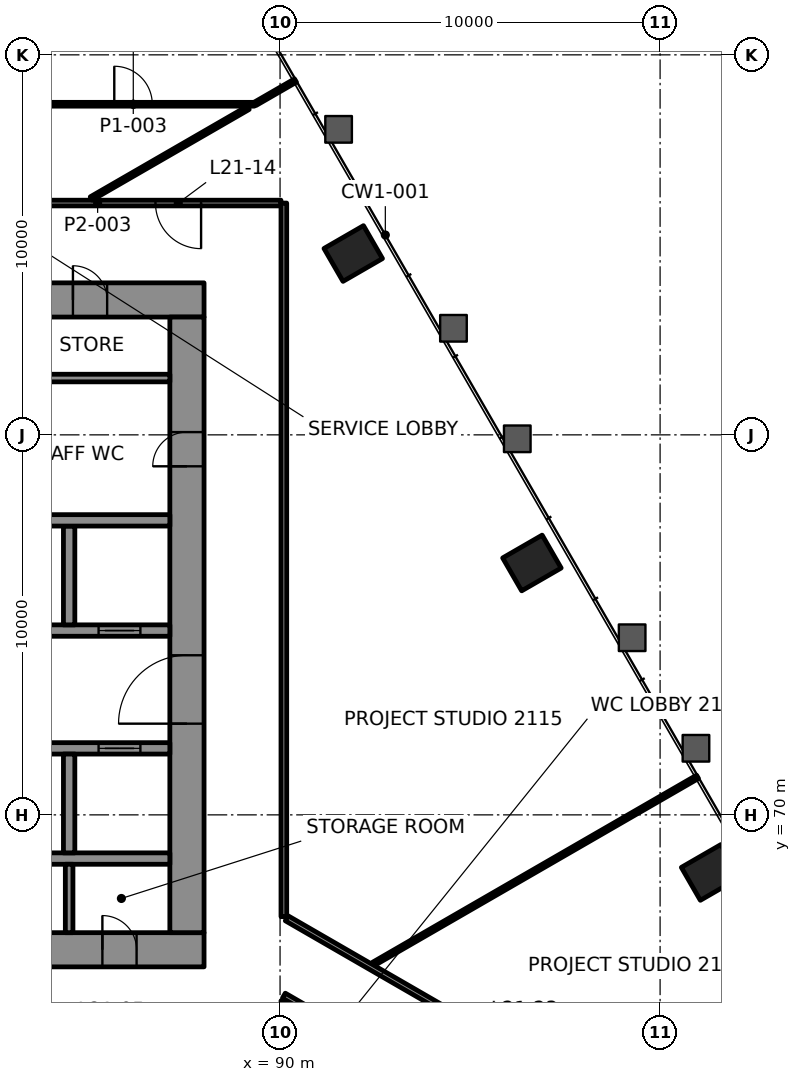
"""IFC4 building model, lengths in metres.
Left out: names, types, materials, properties, quantities, classifications, styles, units other than length and angle.
Written with IfcOpenShell. Run it as: python <this file> out.ifc"""

import sys

from ifc_helpers import new_model, si_unit, direction, frame, frame_2d, origin, origin_2d, place, context, subcontext, project, spatial, rectangle, extrude, element, fill, save


model = new_model("IFC4")
c1 = context("Model", 3, precision=1e-05, world=origin(), true_north=direction((0.0, 1.0)))
c2 = subcontext(c1, "Body", "Model", "MODEL_VIEW")
j1 = project(units=[si_unit("LENGTHUNIT", "METRE"), si_unit("PLANEANGLEUNIT", "RADIAN")], contexts=[c1])
p1 = place(None, origin())
s1 = spatial("IfcSite", under=j1, at=p1, CompositionType="ELEMENT")
p2 = place(p1, origin())
s2 = spatial("IfcBuilding", under=s1, at=p2, CompositionType="ELEMENT")
p3 = place(p2, frame((0.0, 0.0, 94.6)))
s3 = spatial("IfcBuildingStorey", under=s2, at=p3, CompositionType="ELEMENT", Elevation=94.6)
for number, where, z_axis, x_axis in (
    (1, (101.329, 68.485, -0.0), (0.0, 0.0, 1.0), (-0.5, 0.866, 0.0)),
    (2, (96.627, 76.628, -0.0), (0.0, 0.0, 1.0), (-0.5, 0.866, 0.0)),
    (3, (91.926, 84.772, -0.0), (0.0, 0.0, 1.0), (-0.5, 0.866, 0.0)),
):
    element("IfcColumn", number, at=place(p3, frame(where, z_axis=z_axis, x_axis=x_axis)), inside=s3, PredefinedType="COLUMN", context=c2, shape_type="SweptSolid", body=[
        extrude(rectangle(XDim=1.0, YDim=1.2, at=origin_2d()), origin(), (0.0, 0.0, 1.0), 4.2),
    ])
p4 = place(p3, frame((62.0, 66.45, 0.0), z_axis=(0.0, 0.0, 1.0), x_axis=(1.0, 0.0, 0.0)))
e4 = element("IfcWall", 4, at=p4, inside=s3, PredefinedType="SHEAR", context=c2, shape_type="SweptSolid", body=[
    extrude(rectangle(XDim=26.0, YDim=0.9, at=frame_2d((13.0, 0.0))), origin(), (0.0, 0.0, 1.0), 4.0),
])
p5 = place(p4, frame((3.45, 0.0, 0.0)))
e5 = element("IfcOpeningElement", 5, at=p5, cuts=e4, PredefinedType="OPENING", context=c2, shape_type="SweptSolid", body=[
    extrude(rectangle(XDim=0.9, YDim=2.1, at=frame_2d((0.45, 1.05))), frame((0.0, 0.46, 0.0), z_axis=(0.0, -1.0, 0.0), x_axis=(1.0, 0.0, 0.0)), (0.0, 0.0, 1.0), 0.92),
])
p6 = place(p4, frame((6.425, 0.0, 0.0)))
e6 = element("IfcOpeningElement", 6, at=p6, cuts=e4, PredefinedType="OPENING", context=c2, shape_type="SweptSolid", body=[
    extrude(rectangle(XDim=0.9, YDim=2.1, at=frame_2d((0.45, 1.05))), frame((0.0, 0.46, 0.0), z_axis=(0.0, -1.0, 0.0), x_axis=(1.0, 0.0, 0.0)), (0.0, 0.0, 1.0), 0.92),
])
p7 = place(p4, frame((11.5, 0.0, 0.0)))
e7 = element("IfcOpeningElement", 7, at=p7, cuts=e4, PredefinedType="OPENING", context=c2, shape_type="SweptSolid", body=[
    extrude(rectangle(XDim=0.9, YDim=2.1, at=frame_2d((0.45, 1.05))), frame((0.0, 0.46, 0.0), z_axis=(0.0, -1.0, 0.0), x_axis=(1.0, 0.0, 0.0)), (0.0, 0.0, 1.0), 0.92),
])
p8 = place(p4, frame((18.5, 0.0, 0.0)))
e8 = element("IfcOpeningElement", 8, at=p8, cuts=e4, PredefinedType="OPENING", context=c2, shape_type="SweptSolid", body=[
    extrude(rectangle(XDim=0.9, YDim=2.1, at=frame_2d((0.45, 1.05))), frame((0.0, 0.46, 0.0), z_axis=(0.0, -1.0, 0.0), x_axis=(1.0, 0.0, 0.0)), (0.0, 0.0, 1.0), 0.92),
])
p9 = place(p4, frame((23.325, 0.0, 0.0)))
e9 = element("IfcOpeningElement", 9, at=p9, cuts=e4, PredefinedType="OPENING", context=c2, shape_type="SweptSolid", body=[
    extrude(rectangle(XDim=0.9, YDim=2.1, at=frame_2d((0.45, 1.05))), frame((0.0, 0.46, 0.0), z_axis=(0.0, -1.0, 0.0), x_axis=(1.0, 0.0, 0.0)), (0.0, 0.0, 1.0), 0.92),
])
p10 = place(p3, frame((62.0, 83.55, 0.0), z_axis=(0.0, 0.0, 1.0), x_axis=(1.0, 0.0, 0.0)))
e10 = element("IfcWall", 10, at=p10, inside=s3, PredefinedType="SHEAR", context=c2, shape_type="SweptSolid", body=[
    extrude(rectangle(XDim=26.0, YDim=0.9, at=frame_2d((13.0, 0.0))), origin(), (0.0, 0.0, 1.0), 4.0),
])
p11 = place(p10, frame((5.695, 0.0, 0.0)))
e11 = element("IfcOpeningElement", 11, at=p11, cuts=e10, PredefinedType="OPENING", context=c2, shape_type="SweptSolid", body=[
    extrude(rectangle(XDim=1.0, YDim=2.1, at=frame_2d((0.5, 1.05))), frame((0.0, 0.46, 0.0), z_axis=(0.0, -1.0, 0.0), x_axis=(1.0, 0.0, 0.0)), (0.0, 0.0, 1.0), 0.92),
])
p12 = place(p10, frame((19.505, 0.0, 0.0)))
e12 = element("IfcOpeningElement", 12, at=p12, cuts=e10, PredefinedType="OPENING", context=c2, shape_type="SweptSolid", body=[
    extrude(rectangle(XDim=1.0, YDim=2.1, at=frame_2d((0.5, 1.05))), frame((0.0, 0.46, 0.0), z_axis=(0.0, -1.0, 0.0), x_axis=(1.0, 0.0, 0.0)), (0.0, 0.0, 1.0), 0.92),
])
p13 = place(p10, frame((3.45, 0.0, 0.0)))
e13 = element("IfcOpeningElement", 13, at=p13, cuts=e10, PredefinedType="OPENING", context=c2, shape_type="SweptSolid", body=[
    extrude(rectangle(XDim=0.9, YDim=2.1, at=frame_2d((0.45, 1.05))), frame((0.0, 0.46, 0.0), z_axis=(0.0, -1.0, 0.0), x_axis=(1.0, 0.0, 0.0)), (0.0, 0.0, 1.0), 0.92),
])
p14 = place(p10, frame((12.65, 0.0, 0.0)))
e14 = element("IfcOpeningElement", 14, at=p14, cuts=e10, PredefinedType="OPENING", context=c2, shape_type="SweptSolid", body=[
    extrude(rectangle(XDim=0.9, YDim=2.1, at=frame_2d((0.45, 1.05))), frame((0.0, 0.46, 0.0), z_axis=(0.0, -1.0, 0.0), x_axis=(1.0, 0.0, 0.0)), (0.0, 0.0, 1.0), 0.92),
])
p15 = place(p10, frame((22.55, 0.0, 0.0)))
e15 = element("IfcOpeningElement", 15, at=p15, cuts=e10, PredefinedType="OPENING", context=c2, shape_type="SweptSolid", body=[
    extrude(rectangle(XDim=0.9, YDim=2.1, at=frame_2d((0.45, 1.05))), frame((0.0, 0.46, 0.0), z_axis=(0.0, -1.0, 0.0), x_axis=(1.0, 0.0, 0.0)), (0.0, 0.0, 1.0), 0.92),
])
p16 = place(p3, frame((87.55, 66.9, 0.0), z_axis=(0.0, 0.0, 1.0), x_axis=(0.0, 1.0, 0.0)))
e16 = element("IfcWall", 16, at=p16, inside=s3, PredefinedType="SHEAR", context=c2, shape_type="SweptSolid", body=[
    extrude(rectangle(XDim=16.2, YDim=0.9, at=frame_2d((8.1, 0.0))), origin(), (0.0, 0.0, 1.0), 4.0),
])
p17 = place(p16, frame((5.5, 0.0, 0.0)))
e17 = element("IfcOpeningElement", 17, at=p17, cuts=e16, PredefinedType="OPENING", context=c2, shape_type="SweptSolid", body=[
    extrude(rectangle(XDim=1.8, YDim=2.1, at=frame_2d((0.9, 1.05))), frame((0.0, 0.46, 0.0), z_axis=(0.0, -1.0, 0.0), x_axis=(1.0, 0.0, 0.0)), (0.0, 0.0, 1.0), 0.92),
])
p18 = place(p16, frame((12.272, 0.0, 0.0)))
e18 = element("IfcOpeningElement", 18, at=p18, cuts=e16, PredefinedType="OPENING", context=c2, shape_type="SweptSolid", body=[
    extrude(rectangle(XDim=0.9, YDim=2.1, at=frame_2d((0.45, 1.05))), frame((0.0, 0.46, 0.0), z_axis=(0.0, -1.0, 0.0), x_axis=(1.0, 0.0, 0.0)), (0.0, 0.0, 1.0), 0.92),
])
p19 = place(p3, frame((70.35, 68.85, 0.0), z_axis=(0.0, 0.0, 1.0), x_axis=(1.0, 0.0, 0.0)))
e19 = element("IfcWall", 19, at=p19, inside=s3, PredefinedType="SHEAR", context=c2, shape_type="SweptSolid", body=[
    extrude(rectangle(XDim=16.75, YDim=0.3, at=frame_2d((8.375, 0.0))), origin(), (0.0, 0.0, 1.0), 4.0),
])
p20 = place(p3, frame((70.3, 71.75, 0.0), z_axis=(0.0, 0.0, 1.0), x_axis=(1.0, 0.0, 0.0)))
e20 = element("IfcWall", 20, at=p20, inside=s3, PredefinedType="SHEAR", context=c2, shape_type="SweptSolid", body=[
    extrude(rectangle(XDim=16.8, YDim=0.3, at=frame_2d((8.4, 0.0))), origin(), (0.0, 0.0, 1.0), 4.0),
])
p21 = place(p20, frame((1.0, 0.0, 0.0)))
e21 = element("IfcOpeningElement", 21, at=p21, cuts=e20, PredefinedType="OPENING", context=c2, shape_type="SweptSolid", body=[
    extrude(rectangle(XDim=1.1, YDim=2.1, at=frame_2d((0.55, 1.05))), frame((0.0, 0.16, 0.0), z_axis=(0.0, -1.0, 0.0), x_axis=(1.0, 0.0, 0.0)), (0.0, 0.0, 1.0), 0.32),
])
p22 = place(p20, frame((3.8, 0.0, 0.0)))
e22 = element("IfcOpeningElement", 22, at=p22, cuts=e20, PredefinedType="OPENING", context=c2, shape_type="SweptSolid", body=[
    extrude(rectangle(XDim=1.1, YDim=2.1, at=frame_2d((0.55, 1.05))), frame((0.0, 0.16, 0.0), z_axis=(0.0, -1.0, 0.0), x_axis=(1.0, 0.0, 0.0)), (0.0, 0.0, 1.0), 0.32),
])
p23 = place(p20, frame((6.6, 0.0, 0.0)))
e23 = element("IfcOpeningElement", 23, at=p23, cuts=e20, PredefinedType="OPENING", context=c2, shape_type="SweptSolid", body=[
    extrude(rectangle(XDim=1.1, YDim=2.1, at=frame_2d((0.55, 1.05))), frame((0.0, 0.16, 0.0), z_axis=(0.0, -1.0, 0.0), x_axis=(1.0, 0.0, 0.0)), (0.0, 0.0, 1.0), 0.32),
])
p24 = place(p20, frame((9.4, 0.0, 0.0)))
e24 = element("IfcOpeningElement", 24, at=p24, cuts=e20, PredefinedType="OPENING", context=c2, shape_type="SweptSolid", body=[
    extrude(rectangle(XDim=1.1, YDim=2.1, at=frame_2d((0.55, 1.05))), frame((0.0, 0.16, 0.0), z_axis=(0.0, -1.0, 0.0), x_axis=(1.0, 0.0, 0.0)), (0.0, 0.0, 1.0), 0.32),
])
p25 = place(p20, frame((12.2, 0.0, 0.0)))
e25 = element("IfcOpeningElement", 25, at=p25, cuts=e20, PredefinedType="OPENING", context=c2, shape_type="SweptSolid", body=[
    extrude(rectangle(XDim=1.1, YDim=2.1, at=frame_2d((0.55, 1.05))), frame((0.0, 0.16, 0.0), z_axis=(0.0, -1.0, 0.0), x_axis=(1.0, 0.0, 0.0)), (0.0, 0.0, 1.0), 0.32),
])
p26 = place(p20, frame((14.925, 0.0, 0.0)))
e26 = element("IfcOpeningElement", 26, at=p26, cuts=e20, PredefinedType="OPENING", context=c2, shape_type="SweptSolid", body=[
    extrude(rectangle(XDim=1.1, YDim=2.1, at=frame_2d((0.55, 1.05))), frame((0.0, 0.16, 0.0), z_axis=(0.0, -1.0, 0.0), x_axis=(1.0, 0.0, 0.0)), (0.0, 0.0, 1.0), 0.32),
])
p27 = place(p3, frame((70.3, 74.85, 0.0), z_axis=(0.0, 0.0, 1.0), x_axis=(1.0, 0.0, 0.0)))
e27 = element("IfcWall", 27, at=p27, inside=s3, PredefinedType="SHEAR", context=c2, shape_type="SweptSolid", body=[
    extrude(rectangle(XDim=16.8, YDim=0.3, at=frame_2d((8.4, 0.0))), origin(), (0.0, 0.0, 1.0), 4.0),
])
p28 = place(p27, frame((3.8, 0.0, 0.0)))
e28 = element("IfcOpeningElement", 28, at=p28, cuts=e27, PredefinedType="OPENING", context=c2, shape_type="SweptSolid", body=[
    extrude(rectangle(XDim=1.1, YDim=2.1, at=frame_2d((0.55, 1.05))), frame((0.0, 0.16, 0.0), z_axis=(0.0, -1.0, 0.0), x_axis=(1.0, 0.0, 0.0)), (0.0, 0.0, 1.0), 0.32),
])
p29 = place(p27, frame((12.2, 0.0, 0.0)))
e29 = element("IfcOpeningElement", 29, at=p29, cuts=e27, PredefinedType="OPENING", context=c2, shape_type="SweptSolid", body=[
    extrude(rectangle(XDim=1.1, YDim=2.1, at=frame_2d((0.55, 1.05))), frame((0.0, 0.16, 0.0), z_axis=(0.0, -1.0, 0.0), x_axis=(1.0, 0.0, 0.0)), (0.0, 0.0, 1.0), 0.32),
])
p30 = place(p27, frame((14.925, 0.0, 0.0)))
e30 = element("IfcOpeningElement", 30, at=p30, cuts=e27, PredefinedType="OPENING", context=c2, shape_type="SweptSolid", body=[
    extrude(rectangle(XDim=1.1, YDim=2.1, at=frame_2d((0.55, 1.05))), frame((0.0, 0.16, 0.0), z_axis=(0.0, -1.0, 0.0), x_axis=(1.0, 0.0, 0.0)), (0.0, 0.0, 1.0), 0.32),
])
for number, where, z_axis, x_axis in (
    (31, (84.45, 69.0, 0.0), (0.0, 0.0, 1.0), (0.0, 1.0, 0.0)),
    (32, (84.45, 75.0, 0.0), (0.0, 0.0, 1.0), (0.0, 1.0, 0.0)),
):
    element("IfcWall", number, at=place(p3, frame(where, z_axis=z_axis, x_axis=x_axis)), inside=s3, PredefinedType="SHEAR", context=c2, shape_type="SweptSolid", body=[
        extrude(rectangle(XDim=2.6, YDim=0.3, at=frame_2d((1.3, 0.0))), origin(), (0.0, 0.0, 1.0), 4.0),
    ])
p31 = place(p3, frame((64.35, 77.75, 0.0), z_axis=(0.0, 0.0, 1.0), x_axis=(1.0, 0.0, 0.0)))
e33 = element("IfcWall", 33, at=p31, inside=s3, PredefinedType="SHEAR", context=c2, shape_type="SweptSolid", body=[
    extrude(rectangle(XDim=22.75, YDim=0.3, at=frame_2d((11.375, 0.0))), origin(), (0.0, 0.0, 1.0), 4.0),
])
p32 = place(p31, frame((3.345, 0.0, 0.0)))
e34 = element("IfcOpeningElement", 34, at=p32, cuts=e33, PredefinedType="OPENING", context=c2, shape_type="SweptSolid", body=[
    extrude(rectangle(XDim=1.0, YDim=2.1, at=frame_2d((0.5, 1.05))), frame((0.0, 0.16, 0.0), z_axis=(0.0, -1.0, 0.0), x_axis=(1.0, 0.0, 0.0)), (0.0, 0.0, 1.0), 0.32),
])
p33 = place(p3, frame((90.024, 86.1, 0.0), z_axis=(0.0, 0.0, 1.0), x_axis=(-1.0, 0.0, 0.0)))
e35 = element("IfcWall", 35, at=p33, inside=s3, PredefinedType="PARTITIONING", context=c2, shape_type="SweptSolid", body=[
    extrude(rectangle(XDim=9.649, YDim=0.15, at=frame_2d((4.825, 0.0))), origin(), (0.0, 0.0, 1.0), 3.4),
])
p34 = place(p33, frame((2.103, 0.0, 0.0)))
e36 = element("IfcOpeningElement", 36, at=p34, cuts=e35, PredefinedType="OPENING", context=c2, shape_type="SweptSolid", body=[
    extrude(rectangle(XDim=1.2, YDim=2.1, at=frame_2d((0.6, 1.05))), frame((0.0, 0.085, 0.0), z_axis=(0.0, -1.0, 0.0), x_axis=(1.0, 0.0, 0.0)), (0.0, 0.0, 1.0), 0.17),
])
p35 = place(p33, frame((6.823, 0.0, 0.0)))
e37 = element("IfcOpeningElement", 37, at=p35, cuts=e35, PredefinedType="OPENING", context=c2, shape_type="SweptSolid", body=[
    extrude(rectangle(XDim=1.0, YDim=2.1, at=frame_2d((0.5, 1.05))), frame((0.0, 0.085, 0.0), z_axis=(0.0, -1.0, 0.0), x_axis=(1.0, 0.0, 0.0)), (0.0, 0.0, 1.0), 0.17),
])
p36 = place(p3, frame((82.95, 88.7, 0.0), z_axis=(0.0, 0.0, 1.0), x_axis=(1.0, 0.0, 0.0)))
e38 = element("IfcWall", 38, at=p36, inside=s3, PredefinedType="PARTITIONING", context=c2, shape_type="SweptSolid", body=[
    extrude(rectangle(XDim=6.376, YDim=0.1, at=frame_2d((3.188, 0.0))), origin(), (0.0, 0.0, 1.0), 3.4),
])
p37 = place(p36, frame((2.688, 0.0, 0.0)))
e39 = element("IfcOpeningElement", 39, at=p37, cuts=e38, PredefinedType="OPENING", context=c2, shape_type="SweptSolid", body=[
    extrude(rectangle(XDim=1.0, YDim=2.1, at=frame_2d((0.5, 1.05))), frame((0.0, 0.06, 0.0), z_axis=(0.0, -1.0, 0.0), x_axis=(1.0, 0.0, 0.0)), (0.0, 0.0, 1.0), 0.12),
])
p38 = place(p3, frame((92.457, 66.077, 0.0), z_axis=(0.0, 0.0, 1.0), x_axis=(0.866029936849, 0.499992148419, 0.0)))
e40 = element("IfcWall", 40, at=p38, inside=s3, PredefinedType="PARTITIONING", context=c2, shape_type="SweptSolid", body=[
    extrude(rectangle(XDim=9.847, YDim=0.1, at=frame_2d((4.924, 0.0))), origin(), (0.0, 0.0, 1.0), 3.165),
])
p39 = place(p3, frame((85.03, 86.22, 0.0), z_axis=(0.0, 0.0, 1.0), x_axis=(0.86602800421, 0.499995495904, 0.0)))
e41 = element("IfcWall", 41, at=p39, inside=s3, PredefinedType="PARTITIONING", context=c2, shape_type="SweptSolid", body=[
    extrude(rectangle(XDim=4.773, YDim=0.1, at=frame_2d((2.386, 0.0))), origin(), (0.0, 0.0, 1.0), 3.4),
])
p40 = place(p3, frame((90.1, 63.975, 0.0), z_axis=(0.0, 0.0, 1.0), x_axis=(0.0, 1.0, 0.0)))
e42 = element("IfcWall", 42, at=p40, inside=s3, PredefinedType="PARTITIONING", context=c2, shape_type="SweptSolid", body=[
    extrude(rectangle(XDim=1.131, YDim=0.15, at=frame_2d((0.565, 0.0))), origin(), (0.0, 0.0, 1.0), 3.247),
])
p41 = place(p3, frame((90.1, 67.321, 0.0), z_axis=(0.0, 0.0, 1.0), x_axis=(0.0, 1.0, 0.0)))
e43 = element("IfcWall", 43, at=p41, inside=s3, PredefinedType="PARTITIONING", context=c2, shape_type="SweptSolid", body=[
    extrude(rectangle(XDim=18.778, YDim=0.15, at=frame_2d((9.389, 0.0))), origin(), (0.0, 0.0, 1.0), 3.4),
])
p42 = place(p3, frame((90.175, 67.278, 0.0), z_axis=(0.0, 0.0, 1.0), x_axis=(0.866020657332, -0.500008221008, 0.0)))
e44 = element("IfcWall", 44, at=p42, inside=s3, PredefinedType="PARTITIONING", context=c2, shape_type="SweptSolid", body=[
    extrude(rectangle(XDim=14.15, YDim=0.15, at=frame_2d((7.075, 0.0))), origin(), (0.0, 0.0, 1.0), 3.4),
])
p43 = place(p42, frame((7.782, 0.0, 0.0)))
e45 = element("IfcOpeningElement", 45, at=p43, cuts=e44, PredefinedType="OPENING", context=c2, shape_type="SweptSolid", body=[
    extrude(rectangle(XDim=0.9, YDim=2.1, at=frame_2d((0.45, 1.05))), frame((0.0, 0.085, 0.0), z_axis=(0.0, -1.0, 0.0), x_axis=(1.0, 0.0, 0.0)), (0.0, 0.0, 1.0), 0.17),
])
p44 = place(p3, frame((101.529, 58.645, 0.0), z_axis=(0.0, 0.0, 1.0), x_axis=(-0.866020144196, 0.500009109764, 0.0)))
e46 = element("IfcWall", 46, at=p44, inside=s3, PredefinedType="PARTITIONING", context=c2, shape_type="SweptSolid", body=[
    extrude(rectangle(XDim=13.197, YDim=0.15, at=frame_2d((6.598, 0.0))), origin(), (0.0, 0.0, 1.0), 3.247),
])
p45 = place(p44, frame((5.467, 0.0, 0.0)))
e47 = element("IfcOpeningElement", 47, at=p45, cuts=e46, PredefinedType="OPENING", context=c2, shape_type="SweptSolid", body=[
    extrude(rectangle(XDim=0.9, YDim=2.1, at=frame_2d((0.45, 1.05))), frame((0.0, 0.085, 0.0), z_axis=(0.0, -1.0, 0.0), x_axis=(1.0, 0.0, 0.0)), (0.0, 0.0, 1.0), 0.17),
])
p46 = place(p3, frame((89.347, 88.713, 0.0), z_axis=(0.0, 0.0, 1.0), x_axis=(0.866109108303, 0.499854991488, 0.0)))
e48 = element("IfcWall", 48, at=p46, inside=s3, PredefinedType="PARTITIONING", context=c2, shape_type="SweptSolid", body=[
    extrude(rectangle(XDim=1.222, YDim=0.1, at=frame_2d((0.611, 0.0))), origin(), (0.0, 0.0, 1.0), 3.165),
])
p47 = place(p3, frame((83.0, 81.495, 0.0), z_axis=(0.0, 0.0, 1.0), x_axis=(1.0, 0.0, 0.0)))
e49 = element("IfcWall", 49, at=p47, inside=s3, PredefinedType="PARTITIONING", context=c2, shape_type="SweptSolid", body=[
    extrude(rectangle(XDim=4.1, YDim=0.2, at=frame_2d((2.05, 0.0))), origin(), (0.0, 0.0, 1.0), 4.0),
])
p48 = place(p3, frame((84.45, 66.9, 0.0), z_axis=(0.0, 0.0, 1.0), x_axis=(0.0, 1.0, 0.0)))
e50 = element("IfcWall", 50, at=p48, inside=s3, PredefinedType="PARTITIONING", context=c2, shape_type="SweptSolid", body=[
    extrude(rectangle(XDim=1.8, YDim=0.2, at=frame_2d((0.9, 0.0))), origin(), (0.0, 0.0, 1.0), 4.0),
])
p49 = place(p34, origin())
e51 = element("IfcDoor", 51, at=p49, inside=s3, OperationType="DOUBLE_DOOR_SINGLE_SWING", PredefinedType="DOOR", context=c2, shape_type="SweptSolid", body=[
    extrude(rectangle(XDim=1.2, YDim=2.1, at=frame_2d((0.6, 1.05))), frame((0.0, 0.025, 0.0), z_axis=(0.0, -1.0, 0.0), x_axis=(1.0, 0.0, 0.0)), (0.0, 0.0, 1.0), 0.05),
])
fill(e36, e51)
p50 = place(p37, origin())
e52 = element("IfcDoor", 52, at=p50, inside=s3, OperationType="SINGLE_SWING_LEFT", PredefinedType="DOOR", context=c2, shape_type="SweptSolid", body=[
    extrude(rectangle(XDim=1.0, YDim=2.1, at=frame_2d((0.5, 1.05))), frame((0.0, 0.025, 0.0), z_axis=(0.0, -1.0, 0.0), x_axis=(1.0, 0.0, 0.0)), (0.0, 0.0, 1.0), 0.05),
])
fill(e39, e52)
p51 = place(p26, origin())
e53 = element("IfcDoor", 53, at=p51, inside=s3, OperationType="DOUBLE_DOOR_SLIDING", PredefinedType="DOOR", context=c2, shape_type="SweptSolid", body=[
    extrude(rectangle(XDim=1.1, YDim=2.1, at=frame_2d((0.55, 1.05))), frame((0.0, 0.025, 0.0), z_axis=(0.0, -1.0, 0.0), x_axis=(1.0, 0.0, 0.0)), (0.0, 0.0, 1.0), 0.05),
])
fill(e26, e53)
p52 = place(p30, origin())
e54 = element("IfcDoor", 54, at=p52, inside=s3, OperationType="DOUBLE_DOOR_SLIDING", PredefinedType="DOOR", context=c2, shape_type="SweptSolid", body=[
    extrude(rectangle(XDim=1.1, YDim=2.1, at=frame_2d((0.55, 1.05))), frame((0.0, 0.025, 0.0), z_axis=(0.0, -1.0, 0.0), x_axis=(1.0, 0.0, 0.0)), (0.0, 0.0, 1.0), 0.05),
])
fill(e30, e54)
p53 = place(p17, origin())
e55 = element("IfcDoor", 55, at=p53, inside=s3, OperationType="SINGLE_SWING_RIGHT", PredefinedType="DOOR", context=c2, shape_type="SweptSolid", body=[
    extrude(rectangle(XDim=1.8, YDim=2.1, at=frame_2d((0.9, 1.05))), frame((0.0, 0.17, 0.0), z_axis=(0.0, -1.0, 0.0), x_axis=(1.0, 0.0, 0.0)), (0.0, 0.0, 1.0), 0.34),
])
fill(e17, e55)
p54 = place(p9, origin())
e56 = element("IfcDoor", 56, at=p54, inside=s3, OperationType="SINGLE_SWING_LEFT", PredefinedType="DOOR", context=c2, shape_type="SweptSolid", body=[
    extrude(rectangle(XDim=0.9, YDim=2.1, at=frame_2d((0.45, 1.05))), frame((0.0, 0.17, 0.0), z_axis=(0.0, -1.0, 0.0), x_axis=(1.0, 0.0, 0.0)), (0.0, 0.0, 1.0), 0.34),
])
fill(e9, e56)
p55 = place(p18, origin())
e57 = element("IfcDoor", 57, at=p55, inside=s3, OperationType="SINGLE_SWING_RIGHT", PredefinedType="DOOR", context=c2, shape_type="SweptSolid", body=[
    extrude(rectangle(XDim=0.9, YDim=2.1, at=frame_2d((0.45, 1.05))), frame((0.0, 0.17, 0.0), z_axis=(0.0, -1.0, 0.0), x_axis=(1.0, 0.0, 0.0)), (0.0, 0.0, 1.0), 0.34),
])
fill(e18, e57)
p56 = place(p15, origin())
e58 = element("IfcDoor", 58, at=p56, inside=s3, OperationType="SINGLE_SWING_LEFT", PredefinedType="DOOR", context=c2, shape_type="SweptSolid", body=[
    extrude(rectangle(XDim=0.9, YDim=2.1, at=frame_2d((0.45, 1.05))), frame((0.0, 0.17, 0.0), z_axis=(0.0, -1.0, 0.0), x_axis=(1.0, 0.0, 0.0)), (0.0, 0.0, 1.0), 0.34),
])
fill(e15, e58)
save(model, sys.argv[1])
